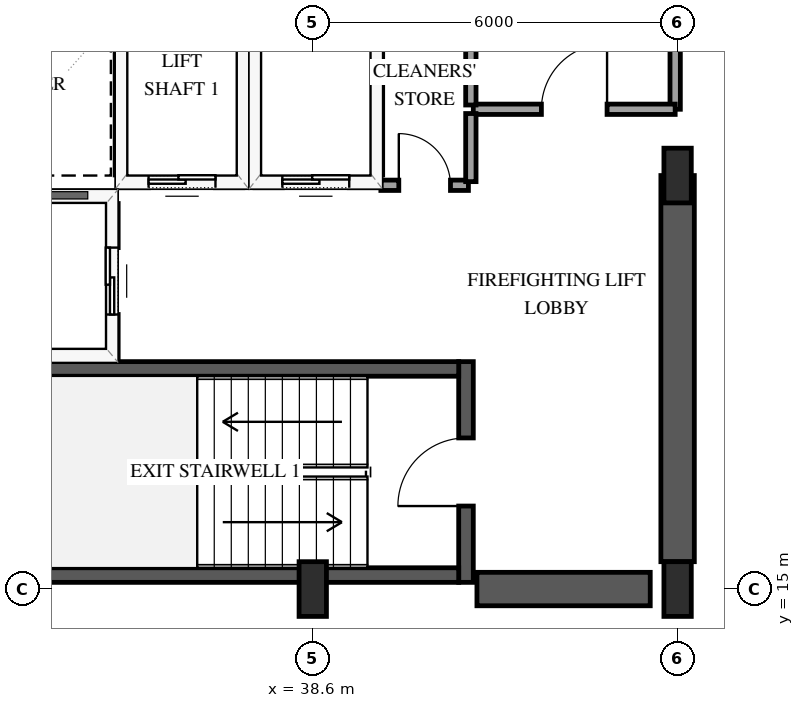
"""IFC4 building model, lengths in metres.
Left out: names, types, materials, properties, quantities, classifications, styles, units other than length and angle.
Written with IfcOpenShell. Run it as: python <this file> out.ifc"""

import sys

from ifc_helpers import new_model, si_unit, direction, frame, frame_2d, origin, origin_2d, place, context, subcontext, project, spatial, rectangle, extrude, element, fill, save


model = new_model("IFC4")
c1 = context("Model", 3, precision=1e-05, world=origin(), true_north=direction((0.0, 1.0)))
c2 = subcontext(c1, "Body", "Model", "MODEL_VIEW")
j1 = project(units=[si_unit("LENGTHUNIT", "METRE"), si_unit("PLANEANGLEUNIT", "RADIAN")], contexts=[c1])
p1 = place(None, origin())
s1 = spatial("IfcSite", under=j1, at=p1, CompositionType="ELEMENT")
p2 = place(p1, origin())
s2 = spatial("IfcBuilding", under=s1, at=p2, CompositionType="ELEMENT")
p3 = place(p2, frame((0.0, 0.0, 106.9)))
s3 = spatial("IfcBuildingStorey", under=s2, at=p3, CompositionType="ELEMENT", Elevation=106.9)
p4 = place(p3, frame((41.12, 15.11, 0.0), z_axis=(0.0, 0.0, 1.0), x_axis=(0.0, 1.0, 0.0)))
e1 = element("IfcWall", 1, at=p4, inside=s3, PredefinedType="SHEAR", context=c2, shape_type="SweptSolid", body=[
    extrude(rectangle(XDim=3.63, YDim=0.24, at=frame_2d((1.815, 0.0))), origin(), (0.0, 0.0, 1.0), 3.9),
])
p5 = place(p4, frame((1.255, 0.0, 0.0)))
e2 = element("IfcOpeningElement", 2, at=p5, cuts=e1, PredefinedType="OPENING", context=c2, shape_type="SweptSolid", body=[
    extrude(rectangle(XDim=1.12, YDim=2.15, at=frame_2d((0.56, 1.075))), frame((0.0, 0.13, 0.0), z_axis=(0.0, -1.0, 0.0), x_axis=(1.0, 0.0, 0.0)), (0.0, 0.0, 1.0), 0.26),
])
for number, where, z_axis, x_axis in (
    (3, (33.0, 15.23, 0.0), (0.0, 0.0, 1.0), (1.0, 0.0, 0.0)),
    (4, (33.0, 18.62, 0.0), (0.0, 0.0, 1.0), (1.0, 0.0, 0.0)),
):
    element("IfcWall", number, at=place(p3, frame(where, z_axis=z_axis, x_axis=x_axis)), inside=s3, PredefinedType="SHEAR", context=c2, shape_type="SweptSolid", body=[
        extrude(rectangle(XDim=8.0, YDim=0.24, at=frame_2d((4.0, 0.0))), origin(), (0.0, 0.0, 1.0), 3.9),
    ])
p6 = place(p3, frame((41.3, 15.0, 0.0), z_axis=(0.0, 0.0, 1.0), x_axis=(1.0, 0.0, 0.0)))
e5 = element("IfcWall", 5, at=p6, inside=s3, PredefinedType="SHEAR", context=c2, shape_type="SweptSolid", body=[
    extrude(rectangle(XDim=2.85, YDim=0.55, at=frame_2d((1.425, 0.0))), origin(), (0.0, 0.0, 1.0), 3.9),
])
p7 = place(p3, frame((44.6, 15.45, 0.0), z_axis=(0.0, 0.0, 1.0), x_axis=(0.0, 1.0, 0.0)))
e6 = element("IfcWall", 6, at=p7, inside=s3, PredefinedType="SHEAR", context=c2, shape_type="SweptSolid", body=[
    extrude(rectangle(XDim=6.35, YDim=0.55, at=frame_2d((3.175, 0.0))), origin(), (0.0, 0.0, 1.0), 3.9),
])
for number, where, z_axis, x_axis in (
    (7, (38.6, 15.0, 0.0), (0.0, 0.0, 1.0), (1.0, 0.0, 0.0)),
    (8, (44.6, 15.0, 0.0), (0.0, 0.0, 1.0), (1.0, 0.0, 0.0)),
    (9, (44.6, 21.8, 0.0), (0.0, 0.0, 1.0), (1.0, 0.0, 0.0)),
):
    element("IfcColumn", number, at=place(p3, frame(where, z_axis=z_axis, x_axis=x_axis)), inside=s3, PredefinedType="PILASTER", context=c2, shape_type="SweptSolid", body=[
        extrude(rectangle(XDim=0.45, YDim=0.9, at=origin_2d()), origin(), (0.0, 0.0, 1.0), 3.9),
    ])
p8 = place(p3, frame((35.45, 21.7, 0.0), z_axis=(0.0, 0.0, 1.0), x_axis=(1.0, 0.0, 0.0)))
e10 = element("IfcWall", 10, at=p8, inside=s3, PredefinedType="SOLIDWALL", context=c2, shape_type="SweptSolid", body=[
    extrude(rectangle(XDim=2.0, YDim=0.2, at=frame_2d((1.0, 0.0))), origin(), (0.0, 0.0, 1.0), 3.6),
])
p9 = place(p8, frame((0.45, 0.0, 0.0)))
e11 = element("IfcOpeningElement", 11, at=p9, cuts=e10, PredefinedType="OPENING", context=c2, shape_type="SweptSolid", body=[
    extrude(rectangle(XDim=1.1, YDim=2.15, at=frame_2d((0.55, 1.075))), frame((0.0, 0.11, 0.0), z_axis=(0.0, -1.0, 0.0), x_axis=(1.0, 0.0, 0.0)), (0.0, 0.0, 1.0), 0.22),
])
for number, where, z_axis, x_axis in (
    (12, (35.45, 21.81, 0.0), (0.0, 0.0, 1.0), (0.0, 1.0, 0.0)),
    (13, (37.45, 21.81, 0.0), (0.0, 0.0, 1.0), (0.0, 1.0, 0.0)),
):
    element("IfcWall", number, at=place(p3, frame(where, z_axis=z_axis, x_axis=x_axis)), inside=s3, PredefinedType="SOLIDWALL", context=c2, shape_type="SweptSolid", body=[
        extrude(rectangle(XDim=2.38, YDim=0.2, at=frame_2d((1.19, 0.0))), origin(), (0.0, 0.0, 1.0), 3.6),
    ])
p10 = place(p3, frame((37.65, 21.7, 0.0), z_axis=(0.0, 0.0, 1.0), x_axis=(1.0, 0.0, 0.0)))
e14 = element("IfcWall", 14, at=p10, inside=s3, PredefinedType="SOLIDWALL", context=c2, shape_type="SweptSolid", body=[
    extrude(rectangle(XDim=2.0, YDim=0.2, at=frame_2d((1.0, 0.0))), origin(), (0.0, 0.0, 1.0), 3.6),
])
p11 = place(p10, frame((0.45, 0.0, 0.0)))
e15 = element("IfcOpeningElement", 15, at=p11, cuts=e14, PredefinedType="OPENING", context=c2, shape_type="SweptSolid", body=[
    extrude(rectangle(XDim=1.1, YDim=2.15, at=frame_2d((0.55, 1.075))), frame((0.0, 0.11, 0.0), z_axis=(0.0, -1.0, 0.0), x_axis=(1.0, 0.0, 0.0)), (0.0, 0.0, 1.0), 0.22),
])
p12 = place(p3, frame((39.65, 21.81, 0.0), z_axis=(0.0, 0.0, 1.0), x_axis=(0.0, 1.0, 0.0)))
e16 = element("IfcWall", 16, at=p12, inside=s3, PredefinedType="SOLIDWALL", context=c2, shape_type="SweptSolid", body=[
    extrude(rectangle(XDim=2.38, YDim=0.2, at=frame_2d((1.19, 0.0))), origin(), (0.0, 0.0, 1.0), 3.6),
])
p13 = place(p3, frame((32.72, 21.45, 0.0), z_axis=(0.0, 0.0, 1.0), x_axis=(1.0, 0.0, 0.0)))
e17 = element("IfcWall", 17, at=p13, inside=s3, PredefinedType="SOLIDWALL", context=c2, shape_type="SweptSolid", body=[
    extrude(rectangle(XDim=2.58, YDim=0.2, at=frame_2d((1.29, 0.0))), origin(), (0.0, 0.0, 1.0), 3.6),
])
p14 = place(p3, frame((35.3, 18.79, 0.0), z_axis=(0.0, 0.0, 1.0), x_axis=(0.0, 1.0, 0.0)))
e18 = element("IfcWall", 18, at=p14, inside=s3, PredefinedType="SOLIDWALL", context=c2, shape_type="SweptSolid", body=[
    extrude(rectangle(XDim=2.55, YDim=0.2, at=frame_2d((1.275, 0.0))), origin(), (0.0, 0.0, 1.0), 3.6),
])
p15 = place(p14, frame((0.725, 0.0, 0.0)))
e19 = element("IfcOpeningElement", 19, at=p15, cuts=e18, PredefinedType="OPENING", context=c2, shape_type="SweptSolid", body=[
    extrude(rectangle(XDim=1.1, YDim=2.15, at=frame_2d((0.55, 1.075))), frame((0.0, 0.11, 0.0), z_axis=(0.0, -1.0, 0.0), x_axis=(1.0, 0.0, 0.0)), (0.0, 0.0, 1.0), 0.22),
])
p16 = place(p3, frame((44.56, 29.8, 0.0), z_axis=(0.0, 0.0, 1.0), x_axis=(0.0, -1.0, 0.0)))
e20 = element("IfcWall", 20, at=p16, inside=s3, PredefinedType="PARTITIONING", context=c2, shape_type="SweptSolid", body=[
    extrude(rectangle(XDim=6.91, YDim=0.17, at=frame_2d((3.455, 0.0))), origin(), (0.0, 0.0, 1.0), 2.64),
])
p17 = place(p16, frame((2.915, 0.0, 0.0)))
e21 = element("IfcOpeningElement", 21, at=p17, cuts=e20, PredefinedType="OPENING", context=c2, shape_type="SweptSolid", body=[
    extrude(rectangle(XDim=1.08, YDim=2.15, at=frame_2d((0.54, 1.075))), frame((0.0, 0.095, 0.0), z_axis=(0.0, -1.0, 0.0), x_axis=(1.0, 0.0, 0.0)), (0.0, 0.0, 1.0), 0.19),
])
p18 = place(p3, frame((41.24, 22.89, 0.0), z_axis=(0.0, 0.0, 1.0), x_axis=(1.0, 0.0, 0.0)))
e22 = element("IfcWall", 22, at=p18, inside=s3, PredefinedType="PARTITIONING", context=c2, shape_type="SweptSolid", body=[
    extrude(rectangle(XDim=3.32, YDim=0.17, at=frame_2d((1.66, 0.0))), origin(), (0.0, 0.0, 1.0), 3.6),
])
p19 = place(p18, frame((1.12, 0.0, 0.0)))
e23 = element("IfcOpeningElement", 23, at=p19, cuts=e22, PredefinedType="OPENING", context=c2, shape_type="SweptSolid", body=[
    extrude(rectangle(XDim=1.08, YDim=2.15, at=frame_2d((0.54, 1.075))), frame((0.0, 0.095, 0.0), z_axis=(0.0, -1.0, 0.0), x_axis=(1.0, 0.0, 0.0)), (0.0, 0.0, 1.0), 0.19),
])
p20 = place(p3, frame((41.2, 22.96, 0.0), z_axis=(0.0, 0.0, 1.0), x_axis=(0.0, 1.0, 0.0)))
e24 = element("IfcWall", 24, at=p20, inside=s3, PredefinedType="PARTITIONING", context=c2, shape_type="SweptSolid", body=[
    extrude(rectangle(XDim=1.69, YDim=0.17, at=frame_2d((0.845, 0.0))), origin(), (0.0, 0.0, 1.0), 3.6),
])
p21 = place(p3, frame((39.72, 21.64, 0.0), z_axis=(0.0, 0.0, 1.0), x_axis=(1.0, 0.0, 0.0)))
e25 = element("IfcWall", 25, at=p21, inside=s3, PredefinedType="PARTITIONING", context=c2, shape_type="SweptSolid", body=[
    extrude(rectangle(XDim=1.44, YDim=0.17, at=frame_2d((0.72, 0.0))), origin(), (0.0, 0.0, 1.0), 3.6),
])
p22 = place(p21, frame((0.295, 0.0, 0.0)))
e26 = element("IfcOpeningElement", 26, at=p22, cuts=e25, PredefinedType="OPENING", context=c2, shape_type="SweptSolid", body=[
    extrude(rectangle(XDim=0.85, YDim=2.1, at=frame_2d((0.425, 1.05))), frame((0.0, 0.095, 0.0), z_axis=(0.0, -1.0, 0.0), x_axis=(1.0, 0.0, 0.0)), (0.0, 0.0, 1.0), 0.19),
])
p23 = place(p3, frame((41.2, 21.7, 0.0), z_axis=(0.0, 0.0, 1.0), x_axis=(0.0, 1.0, 0.0)))
e27 = element("IfcWall", 27, at=p23, inside=s3, PredefinedType="PARTITIONING", context=c2, shape_type="SweptSolid", body=[
    extrude(rectangle(XDim=1.12, YDim=0.17, at=frame_2d((0.56, 0.0))), origin(), (0.0, 0.0, 1.0), 3.6),
])
p24 = place(p9, origin())
e28 = element("IfcDoor", 28, at=p24, inside=s3, OperationType="SLIDING_TO_LEFT", PredefinedType="DOOR", context=c2, shape_type="SweptSolid", body=[
    extrude(rectangle(XDim=1.1, YDim=2.15, at=frame_2d((0.55, 1.075))), frame((0.0, 0.025, 0.0), z_axis=(0.0, -1.0, 0.0), x_axis=(1.0, 0.0, 0.0)), (0.0, 0.0, 1.0), 0.05),
])
fill(e11, e28)
p25 = place(p11, origin())
e29 = element("IfcDoor", 29, at=p25, inside=s3, OperationType="SLIDING_TO_LEFT", PredefinedType="DOOR", context=c2, shape_type="SweptSolid", body=[
    extrude(rectangle(XDim=1.1, YDim=2.15, at=frame_2d((0.55, 1.075))), frame((0.0, 0.025, 0.0), z_axis=(0.0, -1.0, 0.0), x_axis=(1.0, 0.0, 0.0)), (0.0, 0.0, 1.0), 0.05),
])
fill(e15, e29)
p26 = place(p15, origin())
e30 = element("IfcDoor", 30, at=p26, inside=s3, OperationType="SLIDING_TO_LEFT", PredefinedType="DOOR", context=c2, shape_type="SweptSolid", body=[
    extrude(rectangle(XDim=1.1, YDim=2.15, at=frame_2d((0.55, 1.075))), frame((0.0, 0.025, 0.0), z_axis=(0.0, -1.0, 0.0), x_axis=(1.0, 0.0, 0.0)), (0.0, 0.0, 1.0), 0.05),
])
fill(e19, e30)
p27 = place(p5, origin())
e31 = element("IfcDoor", 31, at=p27, inside=s3, OperationType="SINGLE_SWING_LEFT", PredefinedType="DOOR", context=c2, shape_type="SweptSolid", body=[
    extrude(rectangle(XDim=1.12, YDim=2.15, at=frame_2d((0.56, 1.075))), frame((0.0, 0.025, 0.0), z_axis=(0.0, -1.0, 0.0), x_axis=(1.0, 0.0, 0.0)), (0.0, 0.0, 1.0), 0.05),
])
fill(e2, e31)
p28 = place(p19, origin())
e32 = element("IfcDoor", 32, at=p28, inside=s3, OperationType="SINGLE_SWING_RIGHT", PredefinedType="DOOR", context=c2, shape_type="SweptSolid", body=[
    extrude(rectangle(XDim=1.08, YDim=2.15, at=frame_2d((0.54, 1.075))), frame((0.0, 0.025, 0.0), z_axis=(0.0, -1.0, 0.0), x_axis=(1.0, 0.0, 0.0)), (0.0, 0.0, 1.0), 0.05),
])
fill(e23, e32)
p29 = place(p22, origin())
e33 = element("IfcDoor", 33, at=p29, inside=s3, OperationType="SINGLE_SWING_LEFT", PredefinedType="DOOR", context=c2, shape_type="SweptSolid", body=[
    extrude(rectangle(XDim=0.85, YDim=2.1, at=frame_2d((0.425, 1.05))), frame((0.0, 0.025, 0.0), z_axis=(0.0, -1.0, 0.0), x_axis=(1.0, 0.0, 0.0)), (0.0, 0.0, 1.0), 0.05),
])
fill(e26, e33)
save(model, sys.argv[1])
